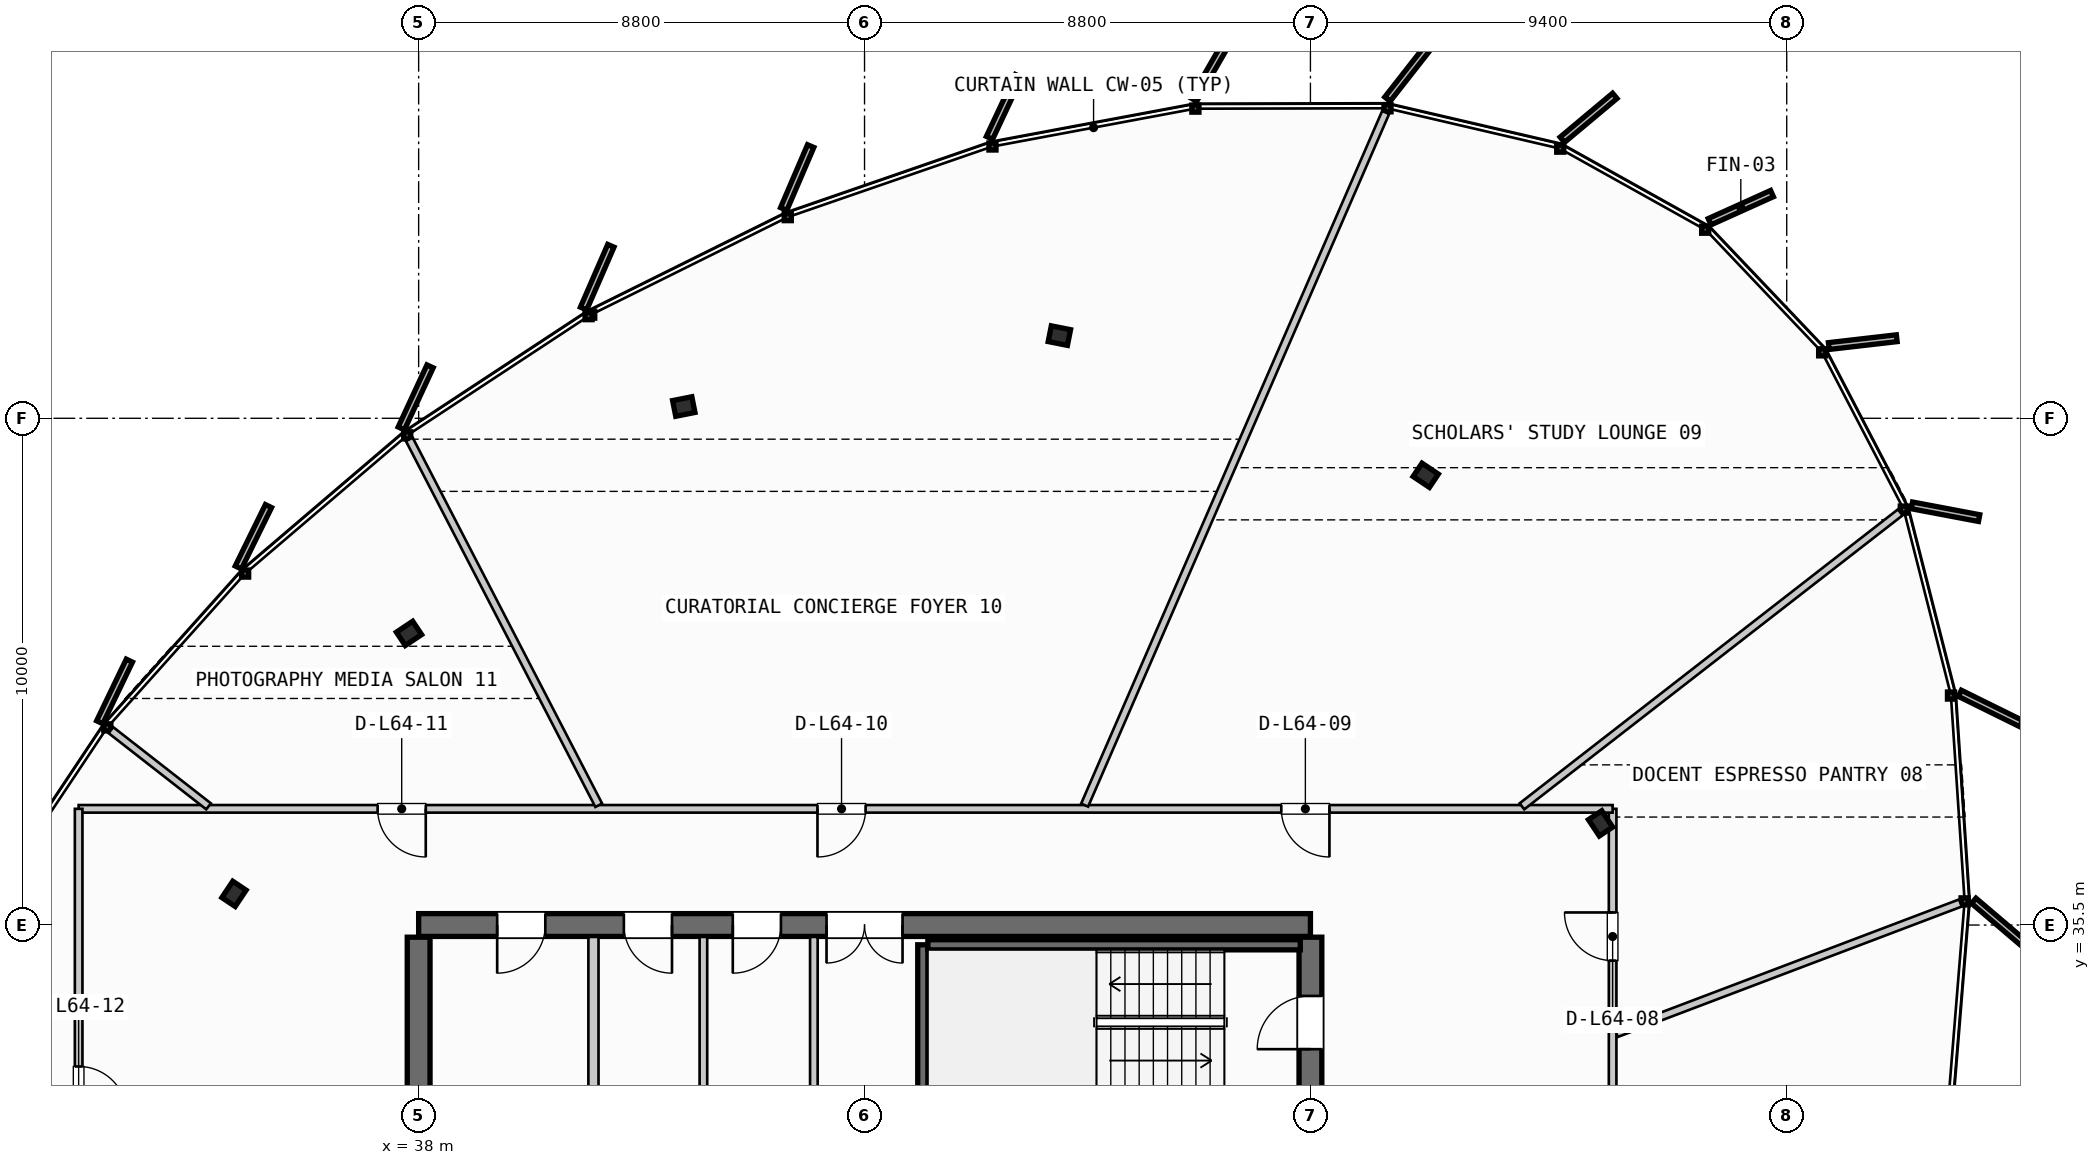
"""IFC4 building model, lengths in metres.
Left out: names, types, materials, properties, quantities, classifications, styles, units other than length and angle.
Written with IfcOpenShell. Run it as: python <this file> out.ifc"""

import sys

from ifc_helpers import new_model, si_unit, direction, frame, frame_2d, origin, origin_2d, place, context, subcontext, project, spatial, rectangle, i_section, extrude, source, transform, mapped, element, fill, save


model = new_model("IFC4")
c1 = context("Model", 3, precision=1e-05, world=origin(), true_north=direction((0.0, 1.0)))
c2 = subcontext(c1, "Body", "Model", "MODEL_VIEW")
j1 = project(units=[si_unit("LENGTHUNIT", "METRE"), si_unit("PLANEANGLEUNIT", "RADIAN")], contexts=[c1])
p1 = place(None, origin())
s1 = spatial("IfcSite", under=j1, at=p1, CompositionType="ELEMENT")
p2 = place(p1, origin())
s2 = spatial("IfcBuilding", under=s1, at=p2, CompositionType="ELEMENT")
p3 = place(p2, frame((0.0, 0.0, 245.65)))
s3 = spatial("IfcBuildingStorey", under=s2, at=p3, CompositionType="ELEMENT", Elevation=245.65)
p4 = place(p3, frame((55.6, 35.5, 0.0), z_axis=(0.0, 0.0, 1.0), x_axis=(-1.0, 0.0, 0.0)))
e1 = element("IfcWall", 1, at=p4, inside=s3, PredefinedType="SHEAR", context=c2, shape_type="SweptSolid", body=[
    extrude(rectangle(XDim=17.6, YDim=0.45, at=frame_2d((8.8, 0.0))), origin(), (0.0, 0.0, 1.0), 3.21),
])
p5 = place(p4, frame((8.05, 0.0, 0.0)))
e2 = element("IfcOpeningElement", 2, at=p5, cuts=e1, PredefinedType="OPENING", context=c2, shape_type="SweptSolid", body=[
    extrude(rectangle(XDim=1.5, YDim=2.2, at=frame_2d((0.75, 1.1))), frame((0.0, 0.235, 0.0), z_axis=(0.0, -1.0, 0.0), x_axis=(1.0, 0.0, 0.0)), (0.0, 0.0, 1.0), 0.47),
])
p6 = place(p4, frame((15.1, 0.0, 0.0)))
e3 = element("IfcOpeningElement", 3, at=p6, cuts=e1, PredefinedType="OPENING", context=c2, shape_type="SweptSolid", body=[
    extrude(rectangle(XDim=0.95, YDim=2.15, at=frame_2d((0.475, 1.075))), frame((0.0, 0.235, 0.0), z_axis=(0.0, -1.0, 0.0), x_axis=(1.0, 0.0, 0.0)), (0.0, 0.0, 1.0), 0.47),
])
p7 = place(p4, frame((12.6, 0.0, 0.0)))
e4 = element("IfcOpeningElement", 4, at=p7, cuts=e1, PredefinedType="OPENING", context=c2, shape_type="SweptSolid", body=[
    extrude(rectangle(XDim=0.95, YDim=2.15, at=frame_2d((0.475, 1.075))), frame((0.0, 0.235, 0.0), z_axis=(0.0, -1.0, 0.0), x_axis=(1.0, 0.0, 0.0)), (0.0, 0.0, 1.0), 0.47),
])
p8 = place(p4, frame((10.45, 0.0, 0.0)))
e5 = element("IfcOpeningElement", 5, at=p8, cuts=e1, PredefinedType="OPENING", context=c2, shape_type="SweptSolid", body=[
    extrude(rectangle(XDim=0.95, YDim=2.15, at=frame_2d((0.475, 1.075))), frame((0.0, 0.235, 0.0), z_axis=(0.0, -1.0, 0.0), x_axis=(1.0, 0.0, 0.0)), (0.0, 0.0, 1.0), 0.47),
])
p9 = place(p3, frame((38.0, 35.26, 0.0), z_axis=(0.0, 0.0, 1.0), x_axis=(0.0, -1.0, 0.0)))
e6 = element("IfcWall", 6, at=p9, inside=s3, PredefinedType="SHEAR", context=c2, shape_type="SweptSolid", body=[
    extrude(rectangle(XDim=14.92, YDim=0.45, at=frame_2d((7.46, 0.0))), origin(), (0.0, 0.0, 1.0), 3.21),
])
p10 = place(p9, frame((5.21, 0.0, 0.0)))
e7 = element("IfcOpeningElement", 7, at=p10, cuts=e6, PredefinedType="OPENING", context=c2, shape_type="SweptSolid", body=[
    extrude(rectangle(XDim=1.1, YDim=2.2, at=frame_2d((0.55, 1.1))), frame((0.0, 0.235, 0.0), z_axis=(0.0, -1.0, 0.0), x_axis=(1.0, 0.0, 0.0)), (0.0, 0.0, 1.0), 0.47),
])
p11 = place(p3, frame((55.6, 20.34, 0.0), z_axis=(0.0, 0.0, 1.0), x_axis=(0.0, 1.0, 0.0)))
e8 = element("IfcWall", 8, at=p11, inside=s3, PredefinedType="SHEAR", context=c2, shape_type="SweptSolid", body=[
    extrude(rectangle(XDim=14.92, YDim=0.45, at=frame_2d((7.46, 0.0))), origin(), (0.0, 0.0, 1.0), 3.21),
])
p12 = place(p11, frame((12.71, 0.0, 0.0)))
e9 = element("IfcOpeningElement", 9, at=p12, cuts=e8, PredefinedType="OPENING", context=c2, shape_type="SweptSolid", body=[
    extrude(rectangle(XDim=1.05, YDim=2.15, at=frame_2d((0.525, 1.075))), frame((0.0, 0.235, 0.0), z_axis=(0.0, -1.0, 0.0), x_axis=(1.0, 0.0, 0.0)), (0.0, 0.0, 1.0), 0.47),
])
p13 = place(p11, frame((8.61, 0.0, 0.0)))
e10 = element("IfcOpeningElement", 10, at=p13, cuts=e8, PredefinedType="OPENING", context=c2, shape_type="SweptSolid", body=[
    extrude(rectangle(XDim=1.1, YDim=2.2, at=frame_2d((0.55, 1.1))), frame((0.0, 0.235, 0.0), z_axis=(0.0, -1.0, 0.0), x_axis=(1.0, 0.0, 0.0)), (0.0, 0.0, 1.0), 0.47),
])
m1 = source(origin(), c2, "Body", "SweptSolid", [
    extrude(i_section(OverallWidth=0.387, OverallDepth=0.316, WebThickness=0.019, FlangeThickness=0.028, FilletRadius=0.015, at=origin_2d()), origin(), (0.0, 0.0, 1.0), 3.21),
])
for number, where, z_axis, x_axis in (
    (11, (61.326, 37.506, 0.0), (0.0, 0.0, 1.0), (0.831, 0.556, 0.0)),
    (12, (57.875, 44.375, 0.0), (0.0, 0.0, 1.0), (0.556, 0.831, 0.0)),
    (13, (50.645, 47.132, 0.0), (0.0, 0.0, 1.0), (0.195, 0.981, 0.0)),
    (14, (43.233, 45.732, 0.0), (0.0, 0.0, 1.0), (-0.195, 0.981, 0.0)),
    (15, (37.81, 41.255, 0.0), (0.0, 0.0, 1.0), (-0.556, 0.831, 0.0)),
    (16, (34.356, 36.115, 0.0), (0.0, 0.0, 1.0), (-0.831, 0.556, 0.0)),
):
    element("IfcColumn", number, at=place(p3, frame(where, z_axis=z_axis, x_axis=x_axis)), inside=s3, PredefinedType="COLUMN", context=c2, shape_type="MappedRepresentation", body=[
        mapped(m1, transform((0.0, 0.0, 0.0), scale=1.0)),
    ])
p14 = place(p3, frame((47.95, 32.05, 0.0), z_axis=(0.0, 0.0, 1.0), x_axis=(0.0, 1.0, 0.0)))
e17 = element("IfcWall", 17, at=p14, inside=s3, PredefinedType="SHEAR", context=c2, shape_type="SweptSolid", body=[
    extrude(rectangle(XDim=3.06, YDim=0.2, at=frame_2d((1.53, 0.0))), origin(), (0.0, 0.0, 1.0), 3.21),
])
p15 = place(p3, frame((48.05, 35.11, 0.0), z_axis=(0.0, 0.0, 1.0), x_axis=(1.0, 0.0, 0.0)))
e18 = element("IfcWall", 18, at=p15, inside=s3, PredefinedType="SHEAR", context=c2, shape_type="SweptSolid", body=[
    extrude(rectangle(XDim=7.35, YDim=0.2, at=frame_2d((3.675, 0.0))), origin(), (0.0, 0.0, 1.0), 3.21),
])
p16 = place(p3, frame((41.45, 31.85, 0.0), z_axis=(0.0, 0.0, 1.0), x_axis=(0.0, 1.0, 0.0)))
e19 = element("IfcWall", 19, at=p16, inside=s3, PredefinedType="PARTITIONING", context=c2, shape_type="SweptSolid", body=[
    extrude(rectangle(XDim=3.415, YDim=0.2, at=frame_2d((1.708, 0.0))), origin(), (0.0, 0.0, 1.0), 2.28),
])
p17 = place(p3, frame((45.8, 31.85, 0.0), z_axis=(0.0, 0.0, 1.0), x_axis=(0.0, 1.0, 0.0)))
e20 = element("IfcWall", 20, at=p17, inside=s3, PredefinedType="PARTITIONING", context=c2, shape_type="SweptSolid", body=[
    extrude(rectangle(XDim=3.415, YDim=0.15, at=frame_2d((1.708, 0.0))), origin(), (0.0, 0.0, 1.0), 2.28),
])
p18 = place(p3, frame((43.62, 31.85, 0.0), z_axis=(0.0, 0.0, 1.0), x_axis=(0.0, 1.0, 0.0)))
e21 = element("IfcWall", 21, at=p18, inside=s3, PredefinedType="PLUMBINGWALL", context=c2, shape_type="SweptSolid", body=[
    extrude(rectangle(XDim=3.415, YDim=0.15, at=frame_2d((1.708, 0.0))), origin(), (0.0, 0.0, 1.0), 2.28),
])
p19 = place(p3, frame((61.564, 17.807, 0.0), z_axis=(0.0, 0.0, 1.0), x_axis=(0.0, 1.0, 0.0)))
e22 = element("IfcWall", 22, at=p19, inside=s3, PredefinedType="PARTITIONING", context=c2, shape_type="SweptSolid", body=[
    extrude(rectangle(XDim=19.986, YDim=0.15, at=frame_2d((9.993, 0.0))), origin(), (0.0, 0.0, 1.0), 2.28),
])
p20 = place(p19, frame((1.288, 0.0, 0.0)))
e23 = element("IfcOpeningElement", 23, at=p20, cuts=e22, PredefinedType="OPENING", context=c2, shape_type="SweptSolid", body=[
    extrude(rectangle(XDim=0.95, YDim=2.15, at=frame_2d((0.475, 1.075))), frame((0.0, 0.085, 0.0), z_axis=(0.0, -1.0, 0.0), x_axis=(1.0, 0.0, 0.0)), (0.0, 0.0, 1.0), 0.17),
])
p21 = place(p19, frame((8.755, 0.0, 0.0)))
e24 = element("IfcOpeningElement", 24, at=p21, cuts=e22, PredefinedType="OPENING", context=c2, shape_type="SweptSolid", body=[
    extrude(rectangle(XDim=0.95, YDim=2.15, at=frame_2d((0.475, 1.075))), frame((0.0, 0.085, 0.0), z_axis=(0.0, -1.0, 0.0), x_axis=(1.0, 0.0, 0.0)), (0.0, 0.0, 1.0), 0.17),
])
p22 = place(p19, frame((16.991, 0.0, 0.0)))
e25 = element("IfcOpeningElement", 25, at=p22, cuts=e22, PredefinedType="OPENING", context=c2, shape_type="SweptSolid", body=[
    extrude(rectangle(XDim=0.95, YDim=2.15, at=frame_2d((0.475, 1.075))), frame((0.0, 0.085, 0.0), z_axis=(0.0, -1.0, 0.0), x_axis=(1.0, 0.0, 0.0)), (0.0, 0.0, 1.0), 0.17),
])
p23 = place(p3, frame((61.564, 37.793, 0.0), z_axis=(0.0, 0.0, 1.0), x_axis=(-1.0, 0.0, 0.0)))
e26 = element("IfcWall", 26, at=p23, inside=s3, PredefinedType="PARTITIONING", context=c2, shape_type="SweptSolid", body=[
    extrude(rectangle(XDim=30.274, YDim=0.15, at=frame_2d((15.137, 0.0))), origin(), (0.0, 0.0, 1.0), 2.28),
])
p24 = place(p23, frame((5.589, 0.0, 0.0)))
e27 = element("IfcOpeningElement", 27, at=p24, cuts=e26, PredefinedType="OPENING", context=c2, shape_type="SweptSolid", body=[
    extrude(rectangle(XDim=0.95, YDim=2.15, at=frame_2d((0.475, 1.075))), frame((0.0, 0.085, 0.0), z_axis=(0.0, -1.0, 0.0), x_axis=(1.0, 0.0, 0.0)), (0.0, 0.0, 1.0), 0.17),
])
p25 = place(p23, frame((14.743, 0.0, 0.0)))
e28 = element("IfcOpeningElement", 28, at=p25, cuts=e26, PredefinedType="OPENING", context=c2, shape_type="SweptSolid", body=[
    extrude(rectangle(XDim=0.95, YDim=2.15, at=frame_2d((0.475, 1.075))), frame((0.0, 0.085, 0.0), z_axis=(0.0, -1.0, 0.0), x_axis=(1.0, 0.0, 0.0)), (0.0, 0.0, 1.0), 0.17),
])
p26 = place(p23, frame((23.423, 0.0, 0.0)))
e29 = element("IfcOpeningElement", 29, at=p26, cuts=e26, PredefinedType="OPENING", context=c2, shape_type="SweptSolid", body=[
    extrude(rectangle(XDim=0.95, YDim=2.15, at=frame_2d((0.475, 1.075))), frame((0.0, 0.085, 0.0), z_axis=(0.0, -1.0, 0.0), x_axis=(1.0, 0.0, 0.0)), (0.0, 0.0, 1.0), 0.17),
])
p27 = place(p3, frame((31.29, 37.793, 0.0), z_axis=(0.0, 0.0, 1.0), x_axis=(0.0, -1.0, 0.0)))
e30 = element("IfcWall", 30, at=p27, inside=s3, PredefinedType="PARTITIONING", context=c2, shape_type="SweptSolid", body=[
    extrude(rectangle(XDim=19.986, YDim=0.15, at=frame_2d((9.993, 0.0))), origin(), (0.0, 0.0, 1.0), 2.28),
])
p28 = place(p27, frame((14.536, 0.0, 0.0)))
e31 = element("IfcOpeningElement", 31, at=p28, cuts=e30, PredefinedType="OPENING", context=c2, shape_type="SweptSolid", body=[
    extrude(rectangle(XDim=0.95, YDim=2.15, at=frame_2d((0.475, 1.075))), frame((0.0, 0.085, 0.0), z_axis=(0.0, -1.0, 0.0), x_axis=(1.0, 0.0, 0.0)), (0.0, 0.0, 1.0), 0.17),
])
p29 = place(p27, frame((5.084, 0.0, 0.0)))
e32 = element("IfcOpeningElement", 32, at=p29, cuts=e30, PredefinedType="OPENING", context=c2, shape_type="SweptSolid", body=[
    extrude(rectangle(XDim=0.95, YDim=2.15, at=frame_2d((0.475, 1.075))), frame((0.0, 0.085, 0.0), z_axis=(0.0, -1.0, 0.0), x_axis=(1.0, 0.0, 0.0)), (0.0, 0.0, 1.0), 0.17),
])
p30 = place(p3, frame((61.639, 33.361, 0.0), z_axis=(0.0, 0.0, 1.0), x_axis=(0.935050196541, 0.354515345152, 0.0)))
e33 = element("IfcWall", 33, at=p30, inside=s3, PredefinedType="PARTITIONING", context=c2, shape_type="SweptSolid", body=[
    extrude(rectangle(XDim=7.26, YDim=0.15, at=frame_2d((3.63, 0.0))), origin(), (0.0, 0.0, 1.0), 2.28),
])
p31 = place(p3, frame((59.774, 37.842, 0.0), z_axis=(0.0, 0.0, 1.0), x_axis=(0.789655228906, 0.613550828751, 0.0)))
e34 = element("IfcWall", 34, at=p31, inside=s3, PredefinedType="PARTITIONING", context=c2, shape_type="SweptSolid", body=[
    extrude(rectangle(XDim=9.455, YDim=0.15, at=frame_2d((4.728, 0.0))), origin(), (0.0, 0.0, 1.0), 2.28),
])
p32 = place(p3, frame((51.144, 37.866, 0.0), z_axis=(0.0, 0.0, 1.0), x_axis=(0.398607510902, 0.917121612575, 0.0)))
e35 = element("IfcWall", 35, at=p32, inside=s3, PredefinedType="PARTITIONING", context=c2, shape_type="SweptSolid", body=[
    extrude(rectangle(XDim=14.904, YDim=0.15, at=frame_2d((7.452, 0.0))), origin(), (0.0, 0.0, 1.0), 2.28),
])
p33 = place(p3, frame((41.554, 37.864, 0.0), z_axis=(0.0, 0.0, 1.0), x_axis=(-0.459817459347, 0.888013459402, 0.0)))
e36 = element("IfcWall", 36, at=p33, inside=s3, PredefinedType="PARTITIONING", context=c2, shape_type="SweptSolid", body=[
    extrude(rectangle(XDim=8.13, YDim=0.15, at=frame_2d((4.065, 0.0))), origin(), (0.0, 0.0, 1.0), 2.28),
])
p34 = place(p3, frame((33.854, 37.842, 0.0), z_axis=(0.0, 0.0, 1.0), x_axis=(-0.788469366892, 0.61507402601, 0.0)))
e37 = element("IfcWall", 37, at=p34, inside=s3, PredefinedType="PARTITIONING", context=c2, shape_type="SweptSolid", body=[
    extrude(rectangle(XDim=2.444, YDim=0.15, at=frame_2d((1.222, 0.0))), origin(), (0.0, 0.0, 1.0), 2.28),
])
m2 = source(origin(), c2, "Body", "SweptSolid", [
    extrude(rectangle(XDim=1.05, YDim=2.15, at=frame_2d((0.525, 1.075))), frame((0.0, 0.025, 0.0), z_axis=(0.0, -1.0, 0.0), x_axis=(1.0, 0.0, 0.0)), (0.0, 0.0, 1.0), 0.05),
])
p35 = place(p12, origin())
e38 = element("IfcDoor", 38, at=p35, inside=s3, OperationType="SINGLE_SWING_LEFT", PredefinedType="DOOR", context=c2, shape_type="MappedRepresentation", body=[
    mapped(m2, transform((0.0, 0.0, 0.0), scale=1.0)),
])
fill(e9, e38)
m3 = source(origin(), c2, "Body", "SweptSolid", [
    extrude(rectangle(XDim=1.5, YDim=2.2, at=frame_2d((0.75, 1.1))), frame((0.0, 0.025, 0.0), z_axis=(0.0, -1.0, 0.0), x_axis=(1.0, 0.0, 0.0)), (0.0, 0.0, 1.0), 0.05),
])
p36 = place(p5, origin())
e39 = element("IfcDoor", 39, at=p36, inside=s3, OperationType="DOUBLE_DOOR_SINGLE_SWING", PredefinedType="DOOR", context=c2, shape_type="MappedRepresentation", body=[
    mapped(m3, transform((0.0, 0.0, 0.0), scale=1.0)),
])
fill(e2, e39)
m4 = source(origin(), c2, "Body", "SweptSolid", [
    extrude(rectangle(XDim=0.95, YDim=2.15, at=frame_2d((0.475, 1.075))), frame((0.0, 0.025, 0.0), z_axis=(0.0, -1.0, 0.0), x_axis=(1.0, 0.0, 0.0)), (0.0, 0.0, 1.0), 0.05),
])
p37 = place(p6, origin())
e40 = element("IfcDoor", 40, at=p37, inside=s3, OperationType="SINGLE_SWING_RIGHT", PredefinedType="DOOR", context=c2, shape_type="MappedRepresentation", body=[
    mapped(m4, transform((0.0, 0.0, 0.0), scale=1.0)),
])
fill(e3, e40)
p38 = place(p7, origin())
e41 = element("IfcDoor", 41, at=p38, inside=s3, OperationType="SINGLE_SWING_LEFT", PredefinedType="DOOR", context=c2, shape_type="MappedRepresentation", body=[
    mapped(m4, transform((0.0, 0.0, 0.0), scale=1.0)),
])
fill(e4, e41)
p39 = place(p8, origin())
e42 = element("IfcDoor", 42, at=p39, inside=s3, OperationType="SINGLE_SWING_RIGHT", PredefinedType="DOOR", context=c2, shape_type="MappedRepresentation", body=[
    mapped(m4, transform((0.0, 0.0, 0.0), scale=1.0)),
])
fill(e5, e42)
p40 = place(p22, origin())
e43 = element("IfcDoor", 43, at=p40, inside=s3, OperationType="SINGLE_SWING_RIGHT", PredefinedType="DOOR", context=c2, shape_type="MappedRepresentation", body=[
    mapped(m4, transform((0.0, 0.0, 0.0), scale=1.0)),
])
fill(e25, e43)
p41 = place(p24, origin())
e44 = element("IfcDoor", 44, at=p41, inside=s3, OperationType="SINGLE_SWING_LEFT", PredefinedType="DOOR", context=c2, shape_type="MappedRepresentation", body=[
    mapped(m4, transform((0.0, 0.0, 0.0), scale=1.0)),
])
fill(e27, e44)
p42 = place(p25, origin())
e45 = element("IfcDoor", 45, at=p42, inside=s3, OperationType="SINGLE_SWING_RIGHT", PredefinedType="DOOR", context=c2, shape_type="MappedRepresentation", body=[
    mapped(m4, transform((0.0, 0.0, 0.0), scale=1.0)),
])
fill(e28, e45)
p43 = place(p26, origin())
e46 = element("IfcDoor", 46, at=p43, inside=s3, OperationType="SINGLE_SWING_LEFT", PredefinedType="DOOR", context=c2, shape_type="MappedRepresentation", body=[
    mapped(m4, transform((0.0, 0.0, 0.0), scale=1.0)),
])
fill(e29, e46)
p44 = place(p29, origin())
e47 = element("IfcDoor", 47, at=p44, inside=s3, OperationType="SINGLE_SWING_RIGHT", PredefinedType="DOOR", context=c2, shape_type="MappedRepresentation", body=[
    mapped(m4, transform((0.0, 0.0, 0.0), scale=1.0)),
])
fill(e32, e47)
save(model, sys.argv[1])
